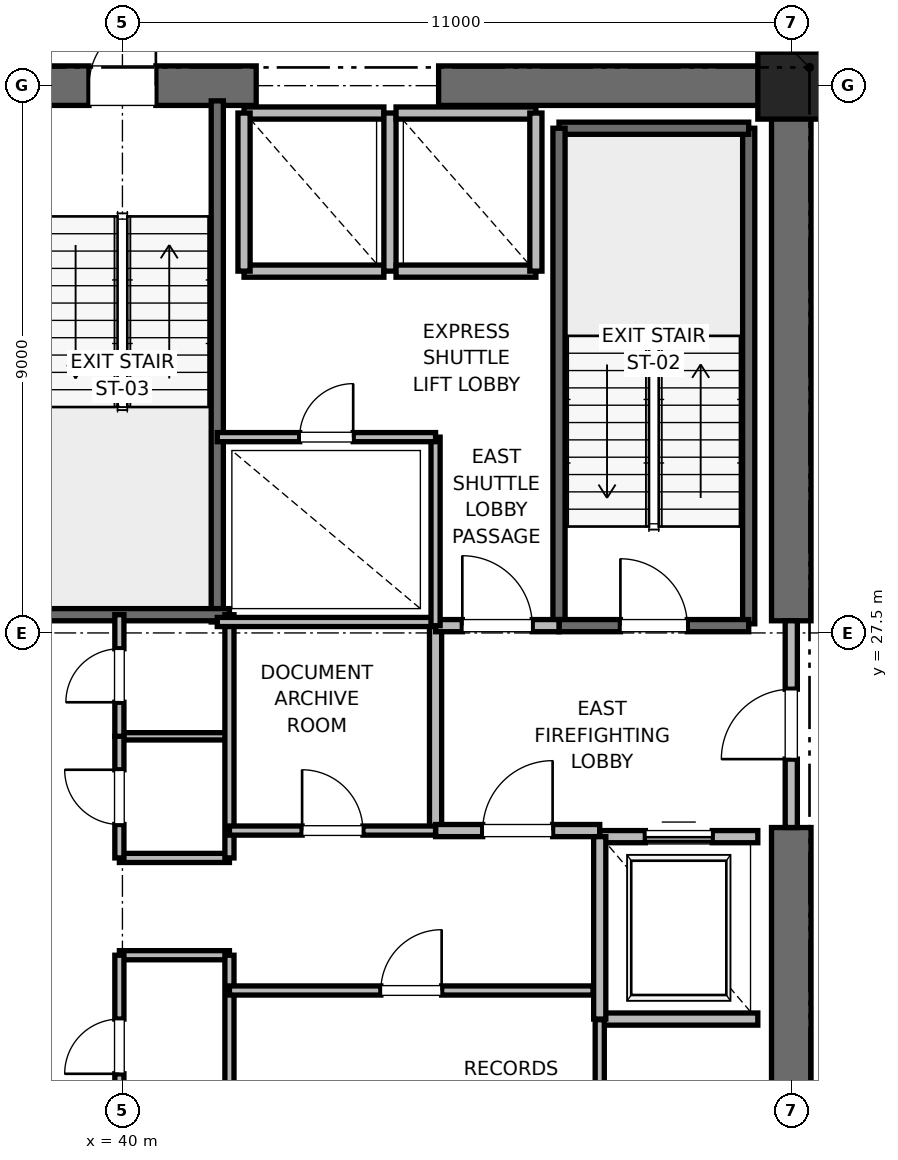
"""IFC4 building model, lengths in metres.
Left out: names, types, materials, properties, quantities, classifications, styles, units other than length and angle.
Written with IfcOpenShell. Run it as: python <this file> out.ifc"""

import sys

from ifc_helpers import new_model, si_unit, direction, frame, frame_2d, origin, origin_2d, place, context, subcontext, project, spatial, rectangle, extrude, element, fill, save


model = new_model("IFC4")
c1 = context("Model", 3, precision=1e-05, world=origin(), true_north=direction((0.0, 1.0)))
c2 = subcontext(c1, "Body", "Model", "MODEL_VIEW")
j1 = project(units=[si_unit("LENGTHUNIT", "METRE"), si_unit("PLANEANGLEUNIT", "RADIAN")], contexts=[c1])
p1 = place(None, origin())
s1 = spatial("IfcSite", under=j1, at=p1, CompositionType="ELEMENT")
p2 = place(p1, origin())
s2 = spatial("IfcBuilding", under=s1, at=p2, CompositionType="ELEMENT")
p3 = place(p2, frame((0.0, 0.0, 91.6)))
s3 = spatial("IfcBuildingStorey", under=s2, at=p3, CompositionType="ELEMENT", Elevation=91.6)
p4 = place(p3, frame((51.0, 36.5, 0.0), z_axis=(0.0, 0.0, 1.0), x_axis=(1.0, 0.0, 0.0)))
e1 = element("IfcColumn", 1, at=p4, inside=s3, PredefinedType="PILASTER", context=c2, shape_type="SweptSolid", body=[
    extrude(rectangle(XDim=1.1, YDim=1.1, at=origin_2d()), origin(), (0.0, 0.0, 1.0), 4.0),
])
p5 = place(p3, frame((37.8, 36.5, 0.0), z_axis=(0.0, 0.0, 1.0), x_axis=(1.0, 0.0, 0.0)))
e2 = element("IfcWall", 2, at=p5, inside=s3, PredefinedType="SHEAR", context=c2, shape_type="SweptSolid", body=[
    extrude(rectangle(XDim=4.4, YDim=0.65, at=frame_2d((2.2, 0.0))), origin(), (0.0, 0.0, 1.0), 3.76),
])
p6 = place(p5, frame((1.65, 0.0, 0.0)))
e3 = element("IfcOpeningElement", 3, at=p6, cuts=e2, PredefinedType="OPENING", context=c2, shape_type="SweptSolid", body=[
    extrude(rectangle(XDim=1.1, YDim=2.15, at=frame_2d((0.55, 1.075))), frame((0.0, 0.325, 0.0), z_axis=(0.0, -1.0, 0.0), x_axis=(1.0, 0.0, 0.0)), (0.0, 0.0, 1.0), 0.65),
])
for number, where, z_axis, x_axis in (
    (4, (45.2, 36.5, 0.0), (0.0, 0.0, 1.0), (1.0, 0.0, 0.0)),
    (5, (51.0, 18.5, 0.0), (0.0, 0.0, 1.0), (0.0, 1.0, 0.0)),
):
    element("IfcWall", number, at=place(p3, frame(where, z_axis=z_axis, x_axis=x_axis)), inside=s3, PredefinedType="SHEAR", context=c2, shape_type="SweptSolid", body=[
        extrude(rectangle(XDim=5.8, YDim=0.65, at=frame_2d((2.9, 0.0))), origin(), (0.0, 0.0, 1.0), 3.76),
    ])
p7 = place(p3, frame((51.0, 27.7, 0.0), z_axis=(0.0, 0.0, 1.0), x_axis=(0.0, 1.0, 0.0)))
e6 = element("IfcWall", 6, at=p7, inside=s3, PredefinedType="SHEAR", context=c2, shape_type="SweptSolid", body=[
    extrude(rectangle(XDim=8.8, YDim=0.65, at=frame_2d((4.4, 0.0))), origin(), (0.0, 0.0, 1.0), 3.76),
])
p8 = place(p3, frame((50.3, 27.65, 0.0), z_axis=(0.0, 0.0, 1.0), x_axis=(0.0, 1.0, 0.0)))
e7 = element("IfcWall", 7, at=p8, inside=s3, PredefinedType="SOLIDWALL", context=c2, shape_type="SweptSolid", body=[
    extrude(rectangle(XDim=8.15, YDim=0.2, at=frame_2d((4.075, 0.0))), origin(), (0.0, 0.0, 1.0), 3.76),
])
p9 = place(p3, frame((47.18, 35.8, 0.0), z_axis=(0.0, 0.0, 1.0), x_axis=(1.0, 0.0, 0.0)))
e8 = element("IfcWall", 8, at=p9, inside=s3, PredefinedType="SOLIDWALL", context=c2, shape_type="SweptSolid", body=[
    extrude(rectangle(XDim=3.12, YDim=0.2, at=frame_2d((1.56, 0.0))), origin(), (0.0, 0.0, 1.0), 3.76),
])
p10 = place(p3, frame((47.18, 27.62, 0.0), z_axis=(0.0, 0.0, 1.0), x_axis=(0.0, 1.0, 0.0)))
e9 = element("IfcWall", 9, at=p10, inside=s3, PredefinedType="SOLIDWALL", context=c2, shape_type="SweptSolid", body=[
    extrude(rectangle(XDim=8.18, YDim=0.2, at=frame_2d((4.09, 0.0))), origin(), (0.0, 0.0, 1.0), 3.76),
])
p11 = place(p3, frame((47.18, 27.62, 0.0), z_axis=(0.0, 0.0, 1.0), x_axis=(1.0, 0.0, 0.0)))
e10 = element("IfcWall", 10, at=p11, inside=s3, PredefinedType="SOLIDWALL", context=c2, shape_type="SweptSolid", body=[
    extrude(rectangle(XDim=3.12, YDim=0.2, at=frame_2d((1.56, 0.0))), origin(), (0.0, 0.0, 1.0), 3.76),
])
p12 = place(p11, frame((1.01, 0.0, 0.0)))
e11 = element("IfcOpeningElement", 11, at=p12, cuts=e10, PredefinedType="OPENING", context=c2, shape_type="SweptSolid", body=[
    extrude(rectangle(XDim=1.1, YDim=2.15, at=frame_2d((0.55, 1.075))), frame((0.0, 0.1, 0.0), z_axis=(0.0, -1.0, 0.0), x_axis=(1.0, 0.0, 0.0)), (0.0, 0.0, 1.0), 0.2),
])
p13 = place(p3, frame((41.56, 27.68, 0.0), z_axis=(0.0, 0.0, 1.0), x_axis=(0.0, 1.0, 0.0)))
e12 = element("IfcWall", 12, at=p13, inside=s3, PredefinedType="SOLIDWALL", context=c2, shape_type="SweptSolid", body=[
    extrude(rectangle(XDim=8.57, YDim=0.2, at=frame_2d((4.285, 0.0))), origin(), (0.0, 0.0, 1.0), 3.76),
])
p14 = place(p3, frame((38.44, 27.8, 0.0), z_axis=(0.0, 0.0, 1.0), x_axis=(1.0, 0.0, 0.0)))
e13 = element("IfcWall", 13, at=p14, inside=s3, PredefinedType="SOLIDWALL", context=c2, shape_type="SweptSolid", body=[
    extrude(rectangle(XDim=3.32, YDim=0.2, at=frame_2d((1.66, 0.0))), origin(), (0.0, 0.0, 1.0), 3.76),
])
p15 = place(p3, frame((45.15, 24.25, 0.0), z_axis=(0.0, 0.0, 1.0), x_axis=(0.0, 1.0, 0.0)))
e14 = element("IfcWall", 14, at=p15, inside=s3, PredefinedType="PARTITIONING", context=c2, shape_type="SweptSolid", body=[
    extrude(rectangle(XDim=3.37, YDim=0.2, at=frame_2d((1.685, 0.0))), origin(), (0.0, 0.0, 1.0), 3.76),
])
p16 = place(p3, frame((45.15, 24.25, 0.0), z_axis=(0.0, 0.0, 1.0), x_axis=(1.0, 0.0, 0.0)))
e15 = element("IfcWall", 15, at=p16, inside=s3, PredefinedType="PARTITIONING", context=c2, shape_type="SweptSolid", body=[
    extrude(rectangle(XDim=2.7, YDim=0.2, at=frame_2d((1.35, 0.0))), origin(), (0.0, 0.0, 1.0), 3.76),
])
p17 = place(p16, frame((0.775, 0.0, 0.0)))
e16 = element("IfcOpeningElement", 16, at=p17, cuts=e15, PredefinedType="OPENING", context=c2, shape_type="SweptSolid", body=[
    extrude(rectangle(XDim=1.15, YDim=2.2, at=frame_2d((0.575, 1.1))), frame((0.0, 0.1, 0.0), z_axis=(0.0, -1.0, 0.0), x_axis=(1.0, 0.0, 0.0)), (0.0, 0.0, 1.0), 0.2),
])
p18 = place(p3, frame((45.15, 27.62, 0.0), z_axis=(0.0, 0.0, 1.0), x_axis=(1.0, 0.0, 0.0)))
e17 = element("IfcWall", 17, at=p18, inside=s3, PredefinedType="PARTITIONING", context=c2, shape_type="SweptSolid", body=[
    extrude(rectangle(XDim=2.03, YDim=0.2, at=frame_2d((1.015, 0.0))), origin(), (0.0, 0.0, 1.0), 3.76),
])
p19 = place(p18, frame((0.44, 0.0, 0.0)))
e18 = element("IfcOpeningElement", 18, at=p19, cuts=e17, PredefinedType="OPENING", context=c2, shape_type="SweptSolid", body=[
    extrude(rectangle(XDim=1.15, YDim=2.2, at=frame_2d((0.575, 1.1))), frame((0.0, 0.1, 0.0), z_axis=(0.0, -1.0, 0.0), x_axis=(1.0, 0.0, 0.0)), (0.0, 0.0, 1.0), 0.2),
])
p20 = place(p3, frame((51.0, 24.3, 0.0), z_axis=(0.0, 0.0, 1.0), x_axis=(0.0, 1.0, 0.0)))
e19 = element("IfcWall", 19, at=p20, inside=s3, PredefinedType="PARTITIONING", context=c2, shape_type="SweptSolid", body=[
    extrude(rectangle(XDim=3.4, YDim=0.2, at=frame_2d((1.7, 0.0))), origin(), (0.0, 0.0, 1.0), 2.54),
])
p21 = place(p20, frame((1.125, 0.0, 0.0)))
e20 = element("IfcOpeningElement", 20, at=p21, cuts=e19, PredefinedType="OPENING", context=c2, shape_type="SweptSolid", body=[
    extrude(rectangle(XDim=1.15, YDim=2.2, at=frame_2d((0.575, 1.1))), frame((0.0, 0.1, 0.0), z_axis=(0.0, -1.0, 0.0), x_axis=(1.0, 0.0, 0.0)), (0.0, 0.0, 1.0), 0.2),
])
p22 = place(p3, frame((47.85, 21.15, 0.0), z_axis=(0.0, 0.0, 1.0), x_axis=(1.0, 0.0, 0.0)))
e21 = element("IfcWall", 21, at=p22, inside=s3, PredefinedType="SOLIDWALL", context=c2, shape_type="SweptSolid", body=[
    extrude(rectangle(XDim=2.6, YDim=0.2, at=frame_2d((1.3, 0.0))), origin(), (0.0, 0.0, 1.0), 3.76),
])
p23 = place(p3, frame((50.45, 24.15, 0.0), z_axis=(0.0, 0.0, 1.0), x_axis=(-1.0, 0.0, 0.0)))
e22 = element("IfcWall", 22, at=p23, inside=s3, PredefinedType="SOLIDWALL", context=c2, shape_type="SweptSolid", body=[
    extrude(rectangle(XDim=2.6, YDim=0.2, at=frame_2d((1.3, 0.0))), origin(), (0.0, 0.0, 1.0), 2.54),
])
p24 = place(p23, frame((0.75, 0.0, 0.0)))
e23 = element("IfcOpeningElement", 23, at=p24, cuts=e22, PredefinedType="OPENING", context=c2, shape_type="SweptSolid", body=[
    extrude(rectangle(XDim=1.1, YDim=2.2, at=frame_2d((0.55, 1.1))), frame((0.0, 0.1, 0.0), z_axis=(0.0, -1.0, 0.0), x_axis=(1.0, 0.0, 0.0)), (0.0, 0.0, 1.0), 0.2),
])
p25 = place(p3, frame((47.85, 24.15, 0.0), z_axis=(0.0, 0.0, 1.0), x_axis=(0.0, -1.0, 0.0)))
e24 = element("IfcWall", 24, at=p25, inside=s3, PredefinedType="SOLIDWALL", context=c2, shape_type="SweptSolid", body=[
    extrude(rectangle(XDim=3.0, YDim=0.2, at=frame_2d((1.5, 0.0))), origin(), (0.0, 0.0, 1.0), 3.76),
])
p26 = place(p3, frame((42.0, 33.45, 0.0), z_axis=(0.0, 0.0, 1.0), x_axis=(1.0, 0.0, 0.0)))
e25 = element("IfcWall", 25, at=p26, inside=s3, PredefinedType="SOLIDWALL", context=c2, shape_type="SweptSolid", body=[
    extrude(rectangle(XDim=2.3, YDim=0.2, at=frame_2d((1.15, 0.0))), origin(), (0.0, 0.0, 1.0), 3.76),
])
p27 = place(p3, frame((44.3, 36.05, 0.0), z_axis=(0.0, 0.0, 1.0), x_axis=(-1.0, 0.0, 0.0)))
e26 = element("IfcWall", 26, at=p27, inside=s3, PredefinedType="SOLIDWALL", context=c2, shape_type="SweptSolid", body=[
    extrude(rectangle(XDim=2.3, YDim=0.2, at=frame_2d((1.15, 0.0))), origin(), (0.0, 0.0, 1.0), 2.54),
])
for number, where, z_axis, x_axis in (
    (27, (42.0, 36.05, 0.0), (0.0, 0.0, 1.0), (0.0, -1.0, 0.0)),
    (28, (44.4, 33.45, 0.0), (0.0, 0.0, 1.0), (0.0, 1.0, 0.0)),
):
    element("IfcWall", number, at=place(p3, frame(where, z_axis=z_axis, x_axis=x_axis)), inside=s3, PredefinedType="SOLIDWALL", context=c2, shape_type="SweptSolid", body=[
        extrude(rectangle(XDim=2.6, YDim=0.2, at=frame_2d((1.3, 0.0))), origin(), (0.0, 0.0, 1.0), 2.54),
    ])
p28 = place(p3, frame((44.5, 33.45, 0.0), z_axis=(0.0, 0.0, 1.0), x_axis=(1.0, 0.0, 0.0)))
e29 = element("IfcWall", 29, at=p28, inside=s3, PredefinedType="SOLIDWALL", context=c2, shape_type="SweptSolid", body=[
    extrude(rectangle(XDim=2.3, YDim=0.2, at=frame_2d((1.15, 0.0))), origin(), (0.0, 0.0, 1.0), 3.76),
])
p29 = place(p3, frame((46.8, 36.05, 0.0), z_axis=(0.0, 0.0, 1.0), x_axis=(-1.0, 0.0, 0.0)))
e30 = element("IfcWall", 30, at=p29, inside=s3, PredefinedType="SOLIDWALL", context=c2, shape_type="SweptSolid", body=[
    extrude(rectangle(XDim=2.3, YDim=0.2, at=frame_2d((1.15, 0.0))), origin(), (0.0, 0.0, 1.0), 2.54),
])
p30 = place(p3, frame((46.8, 33.45, 0.0), z_axis=(0.0, 0.0, 1.0), x_axis=(0.0, 1.0, 0.0)))
e31 = element("IfcWall", 31, at=p30, inside=s3, PredefinedType="SOLIDWALL", context=c2, shape_type="SweptSolid", body=[
    extrude(rectangle(XDim=2.6, YDim=0.2, at=frame_2d((1.3, 0.0))), origin(), (0.0, 0.0, 1.0), 3.76),
])
for number, where, z_axis, x_axis in (
    (32, (39.95, 22.2, 0.0), (0.0, 0.0, 1.0), (1.0, 0.0, 0.0)),
    (33, (39.95, 23.8, 0.0), (0.0, 0.0, 1.0), (1.0, 0.0, 0.0)),
):
    element("IfcWall", number, at=place(p3, frame(where, z_axis=z_axis, x_axis=x_axis)), inside=s3, PredefinedType="PARTITIONING", context=c2, shape_type="SweptSolid", body=[
        extrude(rectangle(XDim=1.81, YDim=0.15, at=frame_2d((0.905, 0.0))), origin(), (0.0, 0.0, 1.0), 2.85),
    ])
p31 = place(p3, frame((39.95, 25.8, 0.0), z_axis=(0.0, 0.0, 1.0), x_axis=(1.0, 0.0, 0.0)))
e34 = element("IfcWall", 34, at=p31, inside=s3, PredefinedType="PARTITIONING", context=c2, shape_type="SweptSolid", body=[
    extrude(rectangle(XDim=1.81, YDim=0.12, at=frame_2d((0.905, 0.0))), origin(), (0.0, 0.0, 1.0), 2.85),
])
p32 = place(p3, frame((41.76, 18.6, 0.0), z_axis=(0.0, 0.0, 1.0), x_axis=(0.0, 1.0, 0.0)))
e35 = element("IfcWall", 35, at=p32, inside=s3, PredefinedType="PARTITIONING", context=c2, shape_type="SweptSolid", body=[
    extrude(rectangle(XDim=3.6, YDim=0.15, at=frame_2d((1.8, 0.0))), origin(), (0.0, 0.0, 1.0), 2.54),
])
p33 = place(p3, frame((41.76, 23.8, 0.0), z_axis=(0.0, 0.0, 1.0), x_axis=(0.0, 1.0, 0.0)))
e36 = element("IfcWall", 36, at=p33, inside=s3, PredefinedType="PARTITIONING", context=c2, shape_type="SweptSolid", body=[
    extrude(rectangle(XDim=4.0, YDim=0.15, at=frame_2d((2.0, 0.0))), origin(), (0.0, 0.0, 1.0), 2.85),
])
p34 = place(p3, frame((39.95, 19.2, 0.0), z_axis=(0.0, 0.0, 1.0), x_axis=(0.0, 1.0, 0.0)))
e37 = element("IfcWall", 37, at=p34, inside=s3, PredefinedType="PARTITIONING", context=c2, shape_type="SweptSolid", body=[
    extrude(rectangle(XDim=3.0, YDim=0.15, at=frame_2d((1.5, 0.0))), origin(), (0.0, 0.0, 1.0), 2.85),
])
p35 = place(p34, frame((1.05, 0.0, 0.0)))
e38 = element("IfcOpeningElement", 38, at=p35, cuts=e37, PredefinedType="OPENING", context=c2, shape_type="SweptSolid", body=[
    extrude(rectangle(XDim=0.9, YDim=2.1, at=frame_2d((0.45, 1.05))), frame((0.0, 0.075, 0.0), z_axis=(0.0, -1.0, 0.0), x_axis=(1.0, 0.0, 0.0)), (0.0, 0.0, 1.0), 0.15),
])
p36 = place(p3, frame((39.95, 23.8, 0.0), z_axis=(0.0, 0.0, 1.0), x_axis=(0.0, 1.0, 0.0)))
e39 = element("IfcWall", 39, at=p36, inside=s3, PredefinedType="PARTITIONING", context=c2, shape_type="SweptSolid", body=[
    extrude(rectangle(XDim=2.0, YDim=0.15, at=frame_2d((1.0, 0.0))), origin(), (0.0, 0.0, 1.0), 2.85),
])
p37 = place(p36, frame((0.55, 0.0, 0.0)))
e40 = element("IfcOpeningElement", 40, at=p37, cuts=e39, PredefinedType="OPENING", context=c2, shape_type="SweptSolid", body=[
    extrude(rectangle(XDim=0.9, YDim=2.1, at=frame_2d((0.45, 1.05))), frame((0.0, 0.075, 0.0), z_axis=(0.0, -1.0, 0.0), x_axis=(1.0, 0.0, 0.0)), (0.0, 0.0, 1.0), 0.15),
])
p38 = place(p3, frame((39.95, 25.8, 0.0), z_axis=(0.0, 0.0, 1.0), x_axis=(0.0, 1.0, 0.0)))
e41 = element("IfcWall", 41, at=p38, inside=s3, PredefinedType="PARTITIONING", context=c2, shape_type="SweptSolid", body=[
    extrude(rectangle(XDim=2.0, YDim=0.15, at=frame_2d((1.0, 0.0))), origin(), (0.0, 0.0, 1.0), 2.85),
])
p39 = place(p38, frame((0.56, 0.0, 0.0)))
e42 = element("IfcOpeningElement", 42, at=p39, cuts=e41, PredefinedType="OPENING", context=c2, shape_type="SweptSolid", body=[
    extrude(rectangle(XDim=0.88, YDim=2.1, at=frame_2d((0.44, 1.05))), frame((0.0, 0.075, 0.0), z_axis=(0.0, -1.0, 0.0), x_axis=(1.0, 0.0, 0.0)), (0.0, 0.0, 1.0), 0.15),
])
p40 = place(p3, frame((41.56, 27.68, 0.0), z_axis=(0.0, 0.0, 1.0), x_axis=(1.0, 0.0, 0.0)))
e43 = element("IfcWall", 43, at=p40, inside=s3, PredefinedType="PARTITIONING", context=c2, shape_type="SweptSolid", body=[
    extrude(rectangle(XDim=3.59, YDim=0.15, at=frame_2d((1.795, 0.0))), origin(), (0.0, 0.0, 1.0), 2.85),
])
p41 = place(p3, frame((47.85, 18.6, 0.0), z_axis=(0.0, 0.0, 1.0), x_axis=(0.0, 1.0, 0.0)))
e44 = element("IfcWall", 44, at=p41, inside=s3, PredefinedType="PARTITIONING", context=c2, shape_type="SweptSolid", body=[
    extrude(rectangle(XDim=2.54, YDim=0.15, at=frame_2d((1.27, 0.0))), origin(), (0.0, 0.0, 1.0), 2.85),
])
p42 = place(p3, frame((41.76, 21.62, 0.0), z_axis=(0.0, 0.0, 1.0), x_axis=(1.0, 0.0, 0.0)))
e45 = element("IfcWall", 45, at=p42, inside=s3, PredefinedType="PARTITIONING", context=c2, shape_type="SweptSolid", body=[
    extrude(rectangle(XDim=5.98, YDim=0.15, at=frame_2d((2.99, 0.0))), origin(), (0.0, 0.0, 1.0), 2.85),
])
p43 = place(p42, frame((2.49, 0.0, 0.0)))
e46 = element("IfcOpeningElement", 46, at=p43, cuts=e45, PredefinedType="OPENING", context=c2, shape_type="SweptSolid", body=[
    extrude(rectangle(XDim=1.0, YDim=2.15, at=frame_2d((0.5, 1.075))), frame((0.0, 0.075, 0.0), z_axis=(0.0, -1.0, 0.0), x_axis=(1.0, 0.0, 0.0)), (0.0, 0.0, 1.0), 0.15),
])
p44 = place(p3, frame((41.76, 24.25, 0.0), z_axis=(0.0, 0.0, 1.0), x_axis=(1.0, 0.0, 0.0)))
e47 = element("IfcWall", 47, at=p44, inside=s3, PredefinedType="PARTITIONING", context=c2, shape_type="SweptSolid", body=[
    extrude(rectangle(XDim=3.39, YDim=0.15, at=frame_2d((1.695, 0.0))), origin(), (0.0, 0.0, 1.0), 2.85),
])
p45 = place(p44, frame((1.195, 0.0, 0.0)))
e48 = element("IfcOpeningElement", 48, at=p45, cuts=e47, PredefinedType="OPENING", context=c2, shape_type="SweptSolid", body=[
    extrude(rectangle(XDim=1.0, YDim=2.15, at=frame_2d((0.5, 1.075))), frame((0.0, 0.075, 0.0), z_axis=(0.0, -1.0, 0.0), x_axis=(1.0, 0.0, 0.0)), (0.0, 0.0, 1.0), 0.15),
])
p46 = place(p3, frame((45.15, 27.62, 0.0), z_axis=(0.0, 0.0, 1.0), x_axis=(0.0, 1.0, 0.0)))
e49 = element("IfcWall", 49, at=p46, inside=s3, PredefinedType="PARTITIONING", context=c2, shape_type="SweptSolid", body=[
    extrude(rectangle(XDim=3.1, YDim=0.15, at=frame_2d((1.55, 0.0))), origin(), (0.0, 0.0, 1.0), 2.85),
])
p47 = place(p3, frame((41.56, 30.72, 0.0), z_axis=(0.0, 0.0, 1.0), x_axis=(1.0, 0.0, 0.0)))
e50 = element("IfcWall", 50, at=p47, inside=s3, PredefinedType="PARTITIONING", context=c2, shape_type="SweptSolid", body=[
    extrude(rectangle(XDim=3.59, YDim=0.15, at=frame_2d((1.795, 0.0))), origin(), (0.0, 0.0, 1.0), 2.85),
])
p48 = place(p47, frame((1.355, 0.0, 0.0)))
e51 = element("IfcOpeningElement", 51, at=p48, cuts=e50, PredefinedType="OPENING", context=c2, shape_type="SweptSolid", body=[
    extrude(rectangle(XDim=0.88, YDim=2.1, at=frame_2d((0.44, 1.05))), frame((0.0, 0.075, 0.0), z_axis=(0.0, -1.0, 0.0), x_axis=(1.0, 0.0, 0.0)), (0.0, 0.0, 1.0), 0.15),
])
p49 = place(p12, origin())
e52 = element("IfcDoor", 52, at=p49, inside=s3, OperationType="SINGLE_SWING_LEFT", PredefinedType="DOOR", context=c2, shape_type="SweptSolid", body=[
    extrude(rectangle(XDim=1.1, YDim=2.15, at=frame_2d((0.55, 1.075))), frame((0.0, 0.025, 0.0), z_axis=(0.0, -1.0, 0.0), x_axis=(1.0, 0.0, 0.0)), (0.0, 0.0, 1.0), 0.05),
])
fill(e11, e52)
p50 = place(p6, origin())
e53 = element("IfcDoor", 53, at=p50, inside=s3, OperationType="SINGLE_SWING_RIGHT", PredefinedType="DOOR", context=c2, shape_type="SweptSolid", body=[
    extrude(rectangle(XDim=1.1, YDim=2.15, at=frame_2d((0.55, 1.075))), frame((0.0, 0.025, 0.0), z_axis=(0.0, -1.0, 0.0), x_axis=(1.0, 0.0, 0.0)), (0.0, 0.0, 1.0), 0.05),
])
fill(e3, e53)
p51 = place(p17, origin())
e54 = element("IfcDoor", 54, at=p51, inside=s3, OperationType="SINGLE_SWING_RIGHT", PredefinedType="DOOR", context=c2, shape_type="SweptSolid", body=[
    extrude(rectangle(XDim=1.15, YDim=2.2, at=frame_2d((0.575, 1.1))), frame((0.0, 0.025, 0.0), z_axis=(0.0, -1.0, 0.0), x_axis=(1.0, 0.0, 0.0)), (0.0, 0.0, 1.0), 0.05),
])
fill(e16, e54)
p52 = place(p19, origin())
e55 = element("IfcDoor", 55, at=p52, inside=s3, OperationType="SINGLE_SWING_LEFT", PredefinedType="DOOR", context=c2, shape_type="SweptSolid", body=[
    extrude(rectangle(XDim=1.15, YDim=2.2, at=frame_2d((0.575, 1.1))), frame((0.0, 0.025, 0.0), z_axis=(0.0, -1.0, 0.0), x_axis=(1.0, 0.0, 0.0)), (0.0, 0.0, 1.0), 0.05),
])
fill(e18, e55)
p53 = place(p21, origin())
e56 = element("IfcDoor", 56, at=p53, inside=s3, OperationType="SINGLE_SWING_LEFT", PredefinedType="DOOR", context=c2, shape_type="SweptSolid", body=[
    extrude(rectangle(XDim=1.15, YDim=2.2, at=frame_2d((0.575, 1.1))), frame((0.0, 0.025, 0.0), z_axis=(0.0, -1.0, 0.0), x_axis=(1.0, 0.0, 0.0)), (0.0, 0.0, 1.0), 0.05),
])
fill(e20, e56)
p54 = place(p24, origin())
e57 = element("IfcDoor", 57, at=p54, inside=s3, OperationType="SLIDING_TO_RIGHT", PredefinedType="DOOR", context=c2, shape_type="SweptSolid", body=[
    extrude(rectangle(XDim=1.1, YDim=2.2, at=frame_2d((0.55, 1.1))), frame((0.0, 0.025, 0.0), z_axis=(0.0, -1.0, 0.0), x_axis=(1.0, 0.0, 0.0)), (0.0, 0.0, 1.0), 0.05),
])
fill(e23, e57)
p55 = place(p35, origin())
e58 = element("IfcDoor", 58, at=p55, inside=s3, OperationType="SINGLE_SWING_LEFT", PredefinedType="DOOR", context=c2, shape_type="SweptSolid", body=[
    extrude(rectangle(XDim=0.9, YDim=2.1, at=frame_2d((0.45, 1.05))), frame((0.0, 0.025, 0.0), z_axis=(0.0, -1.0, 0.0), x_axis=(1.0, 0.0, 0.0)), (0.0, 0.0, 1.0), 0.05),
])
fill(e38, e58)
p56 = place(p37, origin())
e59 = element("IfcDoor", 59, at=p56, inside=s3, OperationType="SINGLE_SWING_RIGHT", PredefinedType="DOOR", context=c2, shape_type="SweptSolid", body=[
    extrude(rectangle(XDim=0.9, YDim=2.1, at=frame_2d((0.45, 1.05))), frame((0.0, 0.025, 0.0), z_axis=(0.0, -1.0, 0.0), x_axis=(1.0, 0.0, 0.0)), (0.0, 0.0, 1.0), 0.05),
])
fill(e40, e59)
p57 = place(p39, origin())
e60 = element("IfcDoor", 60, at=p57, inside=s3, OperationType="SINGLE_SWING_LEFT", PredefinedType="DOOR", context=c2, shape_type="SweptSolid", body=[
    extrude(rectangle(XDim=0.88, YDim=2.1, at=frame_2d((0.44, 1.05))), frame((0.0, 0.025, 0.0), z_axis=(0.0, -1.0, 0.0), x_axis=(1.0, 0.0, 0.0)), (0.0, 0.0, 1.0), 0.05),
])
fill(e42, e60)
p58 = place(p43, origin())
e61 = element("IfcDoor", 61, at=p58, inside=s3, OperationType="SINGLE_SWING_RIGHT", PredefinedType="DOOR", context=c2, shape_type="SweptSolid", body=[
    extrude(rectangle(XDim=1.0, YDim=2.15, at=frame_2d((0.5, 1.075))), frame((0.0, 0.025, 0.0), z_axis=(0.0, -1.0, 0.0), x_axis=(1.0, 0.0, 0.0)), (0.0, 0.0, 1.0), 0.05),
])
fill(e46, e61)
p59 = place(p45, origin())
e62 = element("IfcDoor", 62, at=p59, inside=s3, OperationType="SINGLE_SWING_LEFT", PredefinedType="DOOR", context=c2, shape_type="SweptSolid", body=[
    extrude(rectangle(XDim=1.0, YDim=2.15, at=frame_2d((0.5, 1.075))), frame((0.0, 0.025, 0.0), z_axis=(0.0, -1.0, 0.0), x_axis=(1.0, 0.0, 0.0)), (0.0, 0.0, 1.0), 0.05),
])
fill(e48, e62)
p60 = place(p48, origin())
e63 = element("IfcDoor", 63, at=p60, inside=s3, OperationType="SINGLE_SWING_RIGHT", PredefinedType="DOOR", context=c2, shape_type="SweptSolid", body=[
    extrude(rectangle(XDim=0.88, YDim=2.1, at=frame_2d((0.44, 1.05))), frame((0.0, 0.025, 0.0), z_axis=(0.0, -1.0, 0.0), x_axis=(1.0, 0.0, 0.0)), (0.0, 0.0, 1.0), 0.05),
])
fill(e51, e63)
save(model, sys.argv[1])
